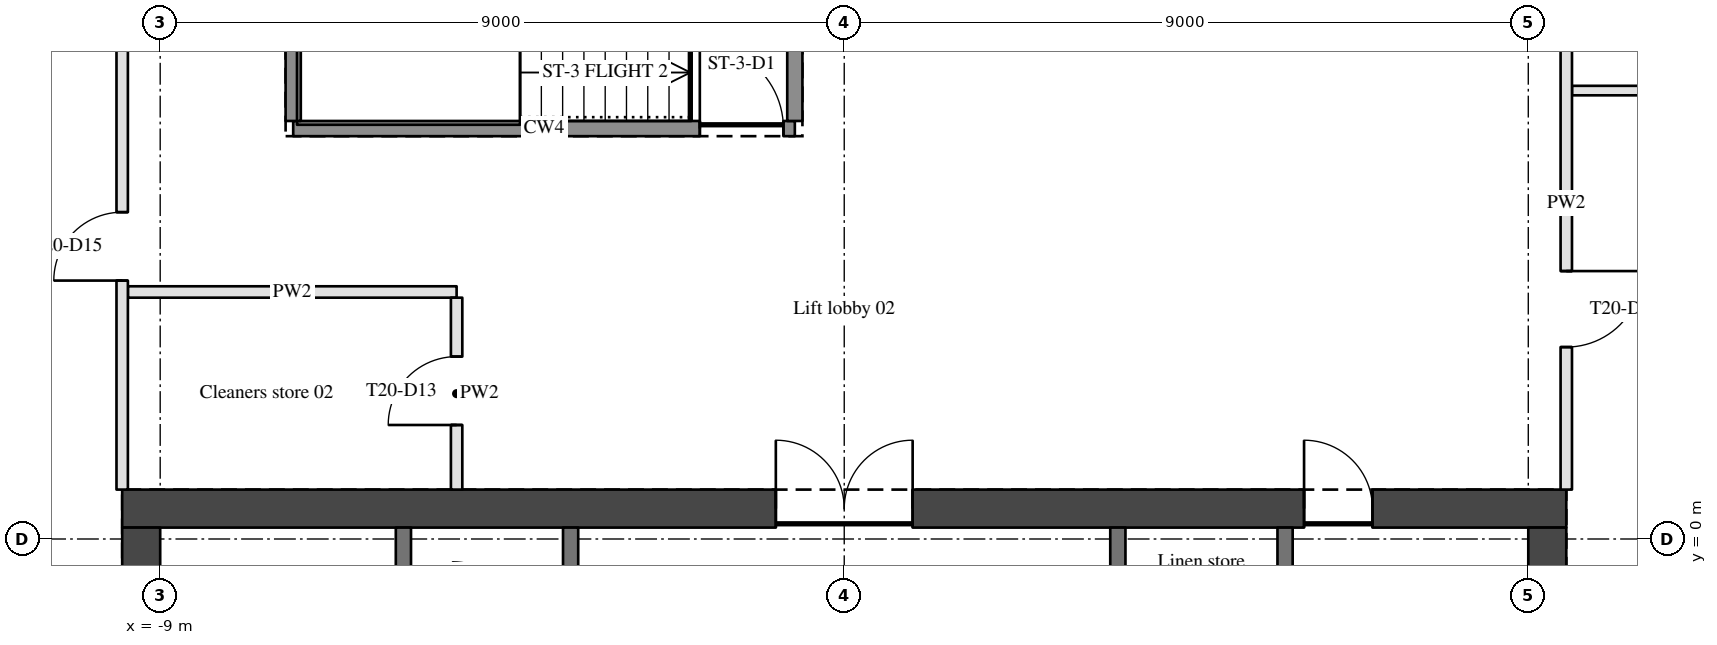
"""IFC4 building model, lengths in metres.
Left out: names, types, materials, properties, quantities, classifications, styles, units other than length and angle.
Written with IfcOpenShell. Run it as: python <this file> out.ifc"""

import sys

from ifc_helpers import new_model, si_unit, direction, frame, frame_2d, origin, place, context, subcontext, project, spatial, rectangle, extrude, element, fill, save


model = new_model("IFC4")
c1 = context("Model", 3, precision=1e-05, world=origin(), true_north=direction((0.0, 1.0)))
c2 = subcontext(c1, "Body", "Model", "MODEL_VIEW")
j1 = project(units=[si_unit("LENGTHUNIT", "METRE"), si_unit("PLANEANGLEUNIT", "RADIAN")], contexts=[c1])
p1 = place(None, origin())
s1 = spatial("IfcSite", under=j1, at=p1, CompositionType="ELEMENT")
p2 = place(p1, origin())
s2 = spatial("IfcBuilding", under=s1, at=p2, CompositionType="ELEMENT")
p3 = place(p2, frame((0.0, 0.0, 259.5)))
s3 = spatial("IfcBuildingStorey", under=s2, at=p3, CompositionType="ELEMENT", Elevation=259.5)
p4 = place(p3, frame((-9.5, 0.4, 0.0), z_axis=(0.0, 0.0, 1.0), x_axis=(1.0, 0.0, 0.0)))
e1 = element("IfcWall", 1, at=p4, inside=s3, PredefinedType="SHEAR", context=c2, shape_type="SweptSolid", body=[
    extrude(rectangle(XDim=19.0, YDim=0.5, at=frame_2d((9.5, 0.0))), origin(), (0.0, 0.0, 1.0), 3.15),
])
p5 = place(p4, frame((8.6, 0.0, 0.0)))
e2 = element("IfcOpeningElement", 2, at=p5, cuts=e1, PredefinedType="OPENING", context=c2, shape_type="SweptSolid", body=[
    extrude(rectangle(XDim=1.8, YDim=2.1, at=frame_2d((0.9, 1.05))), frame((0.0, 0.26, 0.0), z_axis=(0.0, -1.0, 0.0), x_axis=(1.0, 0.0, 0.0)), (0.0, 0.0, 1.0), 0.52),
])
p6 = place(p4, frame((15.55, 0.0, 0.0)))
e3 = element("IfcOpeningElement", 3, at=p6, cuts=e1, PredefinedType="OPENING", context=c2, shape_type="SweptSolid", body=[
    extrude(rectangle(XDim=0.9, YDim=2.1, at=frame_2d((0.45, 1.05))), frame((0.0, 0.26, 0.0), z_axis=(0.0, -1.0, 0.0), x_axis=(1.0, 0.0, 0.0)), (0.0, 0.0, 1.0), 0.52),
])
for number, where, z_axis, x_axis in (
    (4, (-9.25, -11.5, 0.0), (0.0, 0.0, 1.0), (0.0, 1.0, 0.0)),
    (5, (9.25, -11.5, 0.0), (0.0, 0.0, 1.0), (0.0, 1.0, 0.0)),
):
    element("IfcWall", number, at=place(p3, frame(where, z_axis=z_axis, x_axis=x_axis)), inside=s3, PredefinedType="SHEAR", context=c2, shape_type="SweptSolid", body=[
        extrude(rectangle(XDim=11.65, YDim=0.5, at=frame_2d((5.825, 0.0))), origin(), (0.0, 0.0, 1.0), 3.15),
    ])
p7 = place(p3, frame((-9.425, 3.25, 0.0), z_axis=(0.0, 0.0, 1.0), x_axis=(1.0, 0.0, 0.0)))
e6 = element("IfcWall", 6, at=p7, inside=s3, PredefinedType="PARTITIONING", context=c2, shape_type="SweptSolid", body=[
    extrude(rectangle(XDim=4.325, YDim=0.15, at=frame_2d((2.163, 0.0))), origin(), (0.0, 0.0, 1.0), 2.21),
])
p8 = place(p3, frame((-7.25, 5.4, 0.0), z_axis=(0.0, 0.0, 1.0), x_axis=(1.0, 0.0, 0.0)))
e7 = element("IfcWall", 7, at=p8, inside=s3, PredefinedType="SHEAR", context=c2, shape_type="SweptSolid", body=[
    extrude(rectangle(XDim=6.6, YDim=0.2, at=frame_2d((3.3, 0.0))), origin(), (0.0, 0.0, 1.0), 3.15),
])
p9 = place(p8, frame((5.35, 0.0, 0.0)))
e8 = element("IfcOpeningElement", 8, at=p9, cuts=e7, PredefinedType="OPENING", context=c2, shape_type="SweptSolid", body=[
    extrude(rectangle(XDim=1.1, YDim=2.1, at=frame_2d((0.55, 1.05))), frame((0.0, 0.11, 0.0), z_axis=(0.0, -1.0, 0.0), x_axis=(1.0, 0.0, 0.0)), (0.0, 0.0, 1.0), 0.22),
])
p10 = place(p3, frame((9.575, 5.9, 0.0), z_axis=(0.0, 0.0, 1.0), x_axis=(1.0, 0.0, 0.0)))
e9 = element("IfcWall", 9, at=p10, inside=s3, PredefinedType="PARTITIONING", context=c2, shape_type="SweptSolid", body=[
    extrude(rectangle(XDim=2.925, YDim=0.125, at=frame_2d((1.462, 0.0))), origin(), (0.0, 0.0, 1.0), 2.21),
])
p11 = place(p10, frame((0.975, 0.0, 0.0)))
e10 = element("IfcOpeningElement", 10, at=p11, cuts=e9, PredefinedType="OPENING", context=c2, shape_type="SweptSolid", body=[
    extrude(rectangle(XDim=0.9, YDim=2.1, at=frame_2d((0.45, 1.05))), frame((0.0, 0.073, 0.0), z_axis=(0.0, -1.0, 0.0), x_axis=(1.0, 0.0, 0.0)), (0.0, 0.0, 1.0), 0.145),
])
p12 = place(p3, frame((-9.5, 0.65, 0.0), z_axis=(0.0, 0.0, 1.0), x_axis=(0.0, 1.0, 0.0)))
e11 = element("IfcWall", 11, at=p12, inside=s3, PredefinedType="PARTITIONING", context=c2, shape_type="SweptSolid", body=[
    extrude(rectangle(XDim=11.86, YDim=0.15, at=frame_2d((5.93, 0.0))), origin(), (0.0, 0.0, 1.0), 2.21),
])
p13 = place(p12, frame((2.75, 0.0, 0.0)))
e12 = element("IfcOpeningElement", 12, at=p13, cuts=e11, PredefinedType="OPENING", context=c2, shape_type="SweptSolid", body=[
    extrude(rectangle(XDim=0.9, YDim=2.1, at=frame_2d((0.45, 1.05))), frame((0.0, 0.085, 0.0), z_axis=(0.0, -1.0, 0.0), x_axis=(1.0, 0.0, 0.0)), (0.0, 0.0, 1.0), 0.17),
])
p14 = place(p3, frame((-7.25, 5.5, 0.0), z_axis=(0.0, 0.0, 1.0), x_axis=(0.0, 1.0, 0.0)))
e13 = element("IfcWall", 13, at=p14, inside=s3, PredefinedType="SHEAR", context=c2, shape_type="SweptSolid", body=[
    extrude(rectangle(XDim=2.7, YDim=0.2, at=frame_2d((1.35, 0.0))), origin(), (0.0, 0.0, 1.0), 3.15),
])
p15 = place(p3, frame((-5.8, -1.1, 0.0), z_axis=(0.0, 0.0, 1.0), x_axis=(0.0, 1.0, 0.0)))
e14 = element("IfcWall", 14, at=p15, inside=s3, PredefinedType="SOLIDWALL", context=c2, shape_type="SweptSolid", body=[
    extrude(rectangle(XDim=1.25, YDim=0.2, at=frame_2d((0.625, 0.0))), origin(), (0.0, 0.0, 1.0), 2.85),
])
p16 = place(p3, frame((-5.1, 0.65, 0.0), z_axis=(0.0, 0.0, 1.0), x_axis=(0.0, 1.0, 0.0)))
e15 = element("IfcWall", 15, at=p16, inside=s3, PredefinedType="PARTITIONING", context=c2, shape_type="SweptSolid", body=[
    extrude(rectangle(XDim=2.525, YDim=0.15, at=frame_2d((1.263, 0.0))), origin(), (0.0, 0.0, 1.0), 2.21),
])
p17 = place(p16, frame((0.85, 0.0, 0.0)))
e16 = element("IfcOpeningElement", 16, at=p17, cuts=e15, PredefinedType="OPENING", context=c2, shape_type="SweptSolid", body=[
    extrude(rectangle(XDim=0.9, YDim=2.1, at=frame_2d((0.45, 1.05))), frame((0.0, 0.085, 0.0), z_axis=(0.0, -1.0, 0.0), x_axis=(1.0, 0.0, 0.0)), (0.0, 0.0, 1.0), 0.17),
])
p18 = place(p3, frame((-3.6, -1.1, 0.0), z_axis=(0.0, 0.0, 1.0), x_axis=(0.0, 1.0, 0.0)))
e17 = element("IfcWall", 17, at=p18, inside=s3, PredefinedType="SOLIDWALL", context=c2, shape_type="SweptSolid", body=[
    extrude(rectangle(XDim=1.25, YDim=0.2, at=frame_2d((0.625, 0.0))), origin(), (0.0, 0.0, 1.0), 2.85),
])
p19 = place(p3, frame((-0.65, 5.5, 0.0), z_axis=(0.0, 0.0, 1.0), x_axis=(0.0, 1.0, 0.0)))
e18 = element("IfcWall", 18, at=p19, inside=s3, PredefinedType="SHEAR", context=c2, shape_type="SweptSolid", body=[
    extrude(rectangle(XDim=2.7, YDim=0.2, at=frame_2d((1.35, 0.0))), origin(), (0.0, 0.0, 1.0), 3.15),
])
for number, where, z_axis, x_axis in (
    (19, (3.6, -1.1, 0.0), (0.0, 0.0, 1.0), (0.0, 1.0, 0.0)),
    (20, (5.8, -1.1, 0.0), (0.0, 0.0, 1.0), (0.0, 1.0, 0.0)),
):
    element("IfcWall", number, at=place(p3, frame(where, z_axis=z_axis, x_axis=x_axis)), inside=s3, PredefinedType="SOLIDWALL", context=c2, shape_type="SweptSolid", body=[
        extrude(rectangle(XDim=1.25, YDim=0.2, at=frame_2d((0.625, 0.0))), origin(), (0.0, 0.0, 1.0), 2.85),
    ])
p20 = place(p3, frame((9.5, 8.2, 0.0), z_axis=(0.0, 0.0, 1.0), x_axis=(0.0, -1.0, 0.0)))
e21 = element("IfcWall", 21, at=p20, inside=s3, PredefinedType="PARTITIONING", context=c2, shape_type="SweptSolid", body=[
    extrude(rectangle(XDim=7.55, YDim=0.15, at=frame_2d((3.775, 0.0))), origin(), (0.0, 0.0, 1.0), 2.21),
])
p21 = place(p20, frame((4.675, 0.0, 0.0)))
e22 = element("IfcOpeningElement", 22, at=p21, cuts=e21, PredefinedType="OPENING", context=c2, shape_type="SweptSolid", body=[
    extrude(rectangle(XDim=1.0, YDim=2.1, at=frame_2d((0.5, 1.05))), frame((0.0, 0.085, 0.0), z_axis=(0.0, -1.0, 0.0), x_axis=(1.0, 0.0, 0.0)), (0.0, 0.0, 1.0), 0.17),
])
p22 = place(p21, origin())
e23 = element("IfcDoor", 23, at=p22, inside=s3, OperationType="SINGLE_SWING_LEFT", PredefinedType="DOOR", context=c2, shape_type="SweptSolid", body=[
    extrude(rectangle(XDim=1.0, YDim=2.1, at=frame_2d((0.5, 1.05))), frame((0.0, 0.025, 0.0), z_axis=(0.0, -1.0, 0.0), x_axis=(1.0, 0.0, 0.0)), (0.0, 0.0, 1.0), 0.05),
])
fill(e22, e23)
p23 = place(p5, origin())
e24 = element("IfcDoor", 24, at=p23, inside=s3, OperationType="DOUBLE_DOOR_SINGLE_SWING", PredefinedType="DOOR", context=c2, shape_type="SweptSolid", body=[
    extrude(rectangle(XDim=1.8, YDim=2.1, at=frame_2d((0.9, 1.05))), frame((0.0, 0.025, 0.0), z_axis=(0.0, -1.0, 0.0), x_axis=(1.0, 0.0, 0.0)), (0.0, 0.0, 1.0), 0.05),
])
fill(e2, e24)
p24 = place(p9, origin())
e25 = element("IfcDoor", 25, at=p24, inside=s3, OperationType="SINGLE_SWING_LEFT", PredefinedType="DOOR", context=c2, shape_type="SweptSolid", body=[
    extrude(rectangle(XDim=1.1, YDim=2.1, at=frame_2d((0.55, 1.05))), frame((0.0, 0.025, 0.0), z_axis=(0.0, -1.0, 0.0), x_axis=(1.0, 0.0, 0.0)), (0.0, 0.0, 1.0), 0.05),
])
fill(e8, e25)
p25 = place(p6, origin())
e26 = element("IfcDoor", 26, at=p25, inside=s3, OperationType="SINGLE_SWING_LEFT", PredefinedType="DOOR", context=c2, shape_type="SweptSolid", body=[
    extrude(rectangle(XDim=0.9, YDim=2.1, at=frame_2d((0.45, 1.05))), frame((0.0, 0.025, 0.0), z_axis=(0.0, -1.0, 0.0), x_axis=(1.0, 0.0, 0.0)), (0.0, 0.0, 1.0), 0.05),
])
fill(e3, e26)
p26 = place(p17, origin())
e27 = element("IfcDoor", 27, at=p26, inside=s3, OperationType="SINGLE_SWING_LEFT", PredefinedType="DOOR", context=c2, shape_type="SweptSolid", body=[
    extrude(rectangle(XDim=0.9, YDim=2.1, at=frame_2d((0.45, 1.05))), frame((0.0, 0.025, 0.0), z_axis=(0.0, -1.0, 0.0), x_axis=(1.0, 0.0, 0.0)), (0.0, 0.0, 1.0), 0.05),
])
fill(e16, e27)
p27 = place(p13, origin())
e28 = element("IfcDoor", 28, at=p27, inside=s3, OperationType="SINGLE_SWING_LEFT", PredefinedType="DOOR", context=c2, shape_type="SweptSolid", body=[
    extrude(rectangle(XDim=0.9, YDim=2.1, at=frame_2d((0.45, 1.05))), frame((0.0, 0.025, 0.0), z_axis=(0.0, -1.0, 0.0), x_axis=(1.0, 0.0, 0.0)), (0.0, 0.0, 1.0), 0.05),
])
fill(e12, e28)
save(model, sys.argv[1])
